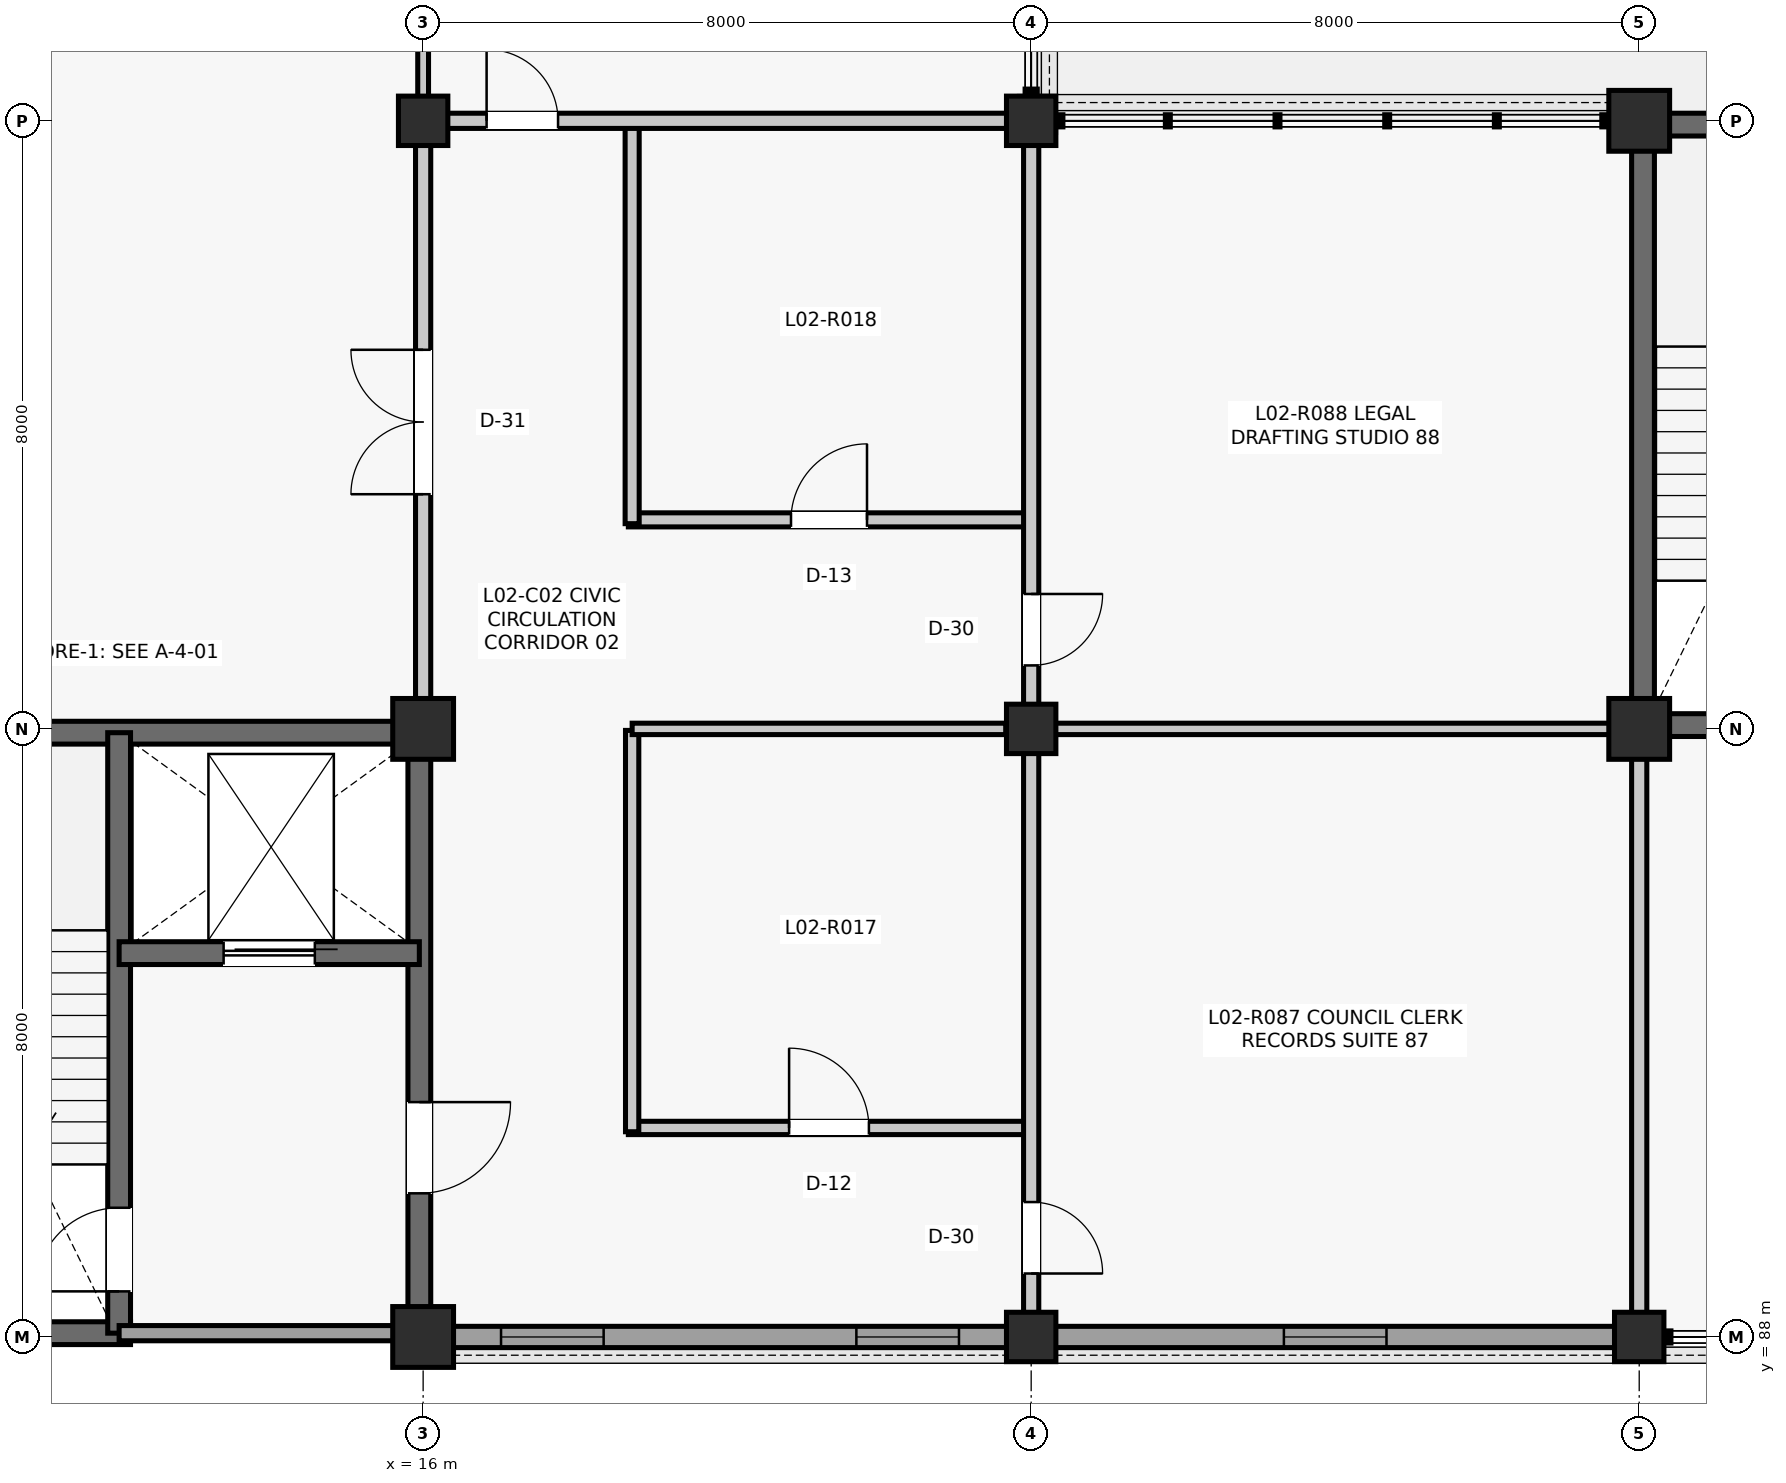
"""IFC4 building model, lengths in metres.
Left out: names, types, materials, properties, quantities, classifications, styles, units other than length and angle.
Written with IfcOpenShell. Run it as: python <this file> out.ifc"""

import sys

from ifc_helpers import new_model, si_unit, direction, frame, frame_2d, origin, origin_2d, place, context, subcontext, project, spatial, rectangle, extrude, element, fill, save


model = new_model("IFC4")
c1 = context("Model", 3, precision=1e-05, world=origin(), true_north=direction((0.0, 1.0)))
c2 = subcontext(c1, "Body", "Model", "MODEL_VIEW")
j1 = project(units=[si_unit("LENGTHUNIT", "METRE"), si_unit("PLANEANGLEUNIT", "RADIAN")], contexts=[c1])
p1 = place(None, origin())
s1 = spatial("IfcSite", under=j1, at=p1, CompositionType="ELEMENT")
p2 = place(p1, origin())
s2 = spatial("IfcBuilding", under=s1, at=p2, CompositionType="ELEMENT")
p3 = place(p2, frame((0.0, 0.0, 9.9)))
s3 = spatial("IfcBuildingStorey", under=s2, at=p3, CompositionType="ELEMENT", Elevation=9.9)
for number, where, z_axis, x_axis in (
    (1, (16.0, 88.0, 0.0), (0.0, 0.0, 1.0), (1.0, 0.0, 0.0)),
    (2, (16.0, 96.0, 0.0), (0.0, 0.0, 1.0), (1.0, 0.0, 0.0)),
):
    element("IfcColumn", number, at=place(p3, frame(where, z_axis=z_axis, x_axis=x_axis)), inside=s3, PredefinedType="COLUMN", context=c2, shape_type="SweptSolid", body=[
        extrude(rectangle(XDim=0.8, YDim=0.8, at=origin_2d()), origin(), (0.0, 0.0, 1.0), 3.96),
    ])
for number, where, z_axis, x_axis in (
    (3, (16.0, 104.0, 0.0), (0.0, 0.0, 1.0), (1.0, 0.0, 0.0)),
    (4, (24.0, 88.0, 0.0), (0.0, 0.0, 1.0), (1.0, 0.0, 0.0)),
    (5, (24.0, 96.0, 0.0), (0.0, 0.0, 1.0), (1.0, 0.0, 0.0)),
    (6, (24.0, 104.0, 0.0), (0.0, 0.0, 1.0), (1.0, 0.0, 0.0)),
    (7, (32.0, 88.0, 0.0), (0.0, 0.0, 1.0), (1.0, 0.0, 0.0)),
):
    element("IfcColumn", number, at=place(p3, frame(where, z_axis=z_axis, x_axis=x_axis)), inside=s3, PredefinedType="COLUMN", context=c2, shape_type="SweptSolid", body=[
        extrude(rectangle(XDim=0.65, YDim=0.65, at=origin_2d()), origin(), (0.0, 0.0, 1.0), 3.96),
    ])
for number, where, z_axis, x_axis in (
    (8, (32.0, 96.0, 0.0), (0.0, 0.0, 1.0), (1.0, 0.0, 0.0)),
    (9, (32.0, 104.0, 0.0), (0.0, 0.0, 1.0), (1.0, 0.0, 0.0)),
):
    element("IfcColumn", number, at=place(p3, frame(where, z_axis=z_axis, x_axis=x_axis)), inside=s3, PredefinedType="COLUMN", context=c2, shape_type="SweptSolid", body=[
        extrude(rectangle(XDim=0.8, YDim=0.8, at=origin_2d()), origin(), (0.0, 0.0, 1.0), 3.96),
    ])
p4 = place(p3, frame((16.385, 88.0, 0.0), z_axis=(0.0, 0.0, 1.0), x_axis=(1.0, 0.0, 0.0)))
e10 = element("IfcWall", 10, at=p4, inside=s3, PredefinedType="SOLIDWALL", context=c2, shape_type="SweptSolid", body=[
    extrude(rectangle(XDim=7.305, YDim=0.28, at=frame_2d((3.652, 0.0))), origin(), (0.0, 0.0, 1.0), 3.347),
])
p5 = place(p4, frame((0.64, 0.0, 0.95)))
e11 = element("IfcOpeningElement", 11, at=p5, cuts=e10, PredefinedType="OPENING", context=c2, shape_type="SweptSolid", body=[
    extrude(rectangle(XDim=1.35, YDim=1.9, at=frame_2d((0.675, 0.95))), frame((0.0, 0.15, 0.0), z_axis=(0.0, -1.0, 0.0), x_axis=(1.0, 0.0, 0.0)), (0.0, 0.0, 1.0), 0.3),
])
p6 = place(p4, frame((5.315, 0.0, 0.95)))
e12 = element("IfcOpeningElement", 12, at=p6, cuts=e10, PredefinedType="OPENING", context=c2, shape_type="SweptSolid", body=[
    extrude(rectangle(XDim=1.35, YDim=1.9, at=frame_2d((0.675, 0.95))), frame((0.0, 0.15, 0.0), z_axis=(0.0, -1.0, 0.0), x_axis=(1.0, 0.0, 0.0)), (0.0, 0.0, 1.0), 0.3),
])
p7 = place(p3, frame((24.31, 88.0, 0.0), z_axis=(0.0, 0.0, 1.0), x_axis=(1.0, 0.0, 0.0)))
e13 = element("IfcWall", 13, at=p7, inside=s3, PredefinedType="SOLIDWALL", context=c2, shape_type="SweptSolid", body=[
    extrude(rectangle(XDim=7.38, YDim=0.28, at=frame_2d((3.69, 0.0))), origin(), (0.0, 0.0, 1.0), 3.28),
])
p8 = place(p7, frame((3.015, 0.0, 0.9)))
e14 = element("IfcOpeningElement", 14, at=p8, cuts=e13, PredefinedType="OPENING", context=c2, shape_type="SweptSolid", body=[
    extrude(rectangle(XDim=1.35, YDim=1.9, at=frame_2d((0.675, 0.95))), frame((0.0, 0.15, 0.0), z_axis=(0.0, -1.0, 0.0), x_axis=(1.0, 0.0, 0.0)), (0.0, 0.0, 1.0), 0.3),
])
p9 = place(p3, frame((8.29, 95.95, 0.0), z_axis=(0.0, 0.0, 1.0), x_axis=(1.0, 0.0, 0.0)))
e15 = element("IfcWall", 15, at=p9, inside=s3, PredefinedType="SHEAR", context=c2, shape_type="SweptSolid", body=[
    extrude(rectangle(XDim=7.42, YDim=0.3, at=frame_2d((3.71, 0.0))), origin(), (0.0, 0.0, 1.0), 3.705),
])
p10 = place(p3, frame((15.95, 88.29, 0.0), z_axis=(0.0, 0.0, 1.0), x_axis=(0.0, 1.0, 0.0)))
e16 = element("IfcWall", 16, at=p10, inside=s3, PredefinedType="SHEAR", context=c2, shape_type="SweptSolid", body=[
    extrude(rectangle(XDim=7.42, YDim=0.3, at=frame_2d((3.71, 0.0))), origin(), (0.0, 0.0, 1.0), 3.705),
])
p11 = place(p10, frame((1.6, 0.0, 0.0)))
e17 = element("IfcOpeningElement", 17, at=p11, cuts=e16, PredefinedType="OPENING", context=c2, shape_type="SweptSolid", body=[
    extrude(rectangle(XDim=1.2, YDim=2.15, at=frame_2d((0.6, 1.075))), frame((0.0, 0.16, 0.0), z_axis=(0.0, -1.0, 0.0), x_axis=(1.0, 0.0, 0.0)), (0.0, 0.0, 1.0), 0.32),
])
p12 = place(p3, frame((8.29, 88.05, 0.0), z_axis=(0.0, 0.0, 1.0), x_axis=(1.0, 0.0, 0.0)))
e18 = element("IfcWall", 18, at=p12, inside=s3, PredefinedType="SHEAR", context=c2, shape_type="SweptSolid", body=[
    extrude(rectangle(XDim=3.86, YDim=0.3, at=frame_2d((1.93, 0.0))), origin(), (0.0, 0.0, 1.0), 3.705),
])
p13 = place(p3, frame((12.0, 88.05, 0.0), z_axis=(0.0, 0.0, 1.0), x_axis=(0.0, 1.0, 0.0)))
e19 = element("IfcWall", 19, at=p13, inside=s3, PredefinedType="SHEAR", context=c2, shape_type="SweptSolid", body=[
    extrude(rectangle(XDim=7.9, YDim=0.3, at=frame_2d((3.95, 0.0))), origin(), (0.0, 0.0, 1.0), 3.705),
])
p14 = place(p13, frame((0.55, 0.0, 0.0)))
e20 = element("IfcOpeningElement", 20, at=p14, cuts=e19, PredefinedType="OPENING", context=c2, shape_type="SweptSolid", body=[
    extrude(rectangle(XDim=1.1, YDim=2.15, at=frame_2d((0.55, 1.075))), frame((0.0, 0.16, 0.0), z_axis=(0.0, -1.0, 0.0), x_axis=(1.0, 0.0, 0.0)), (0.0, 0.0, 1.0), 0.32),
])
p15 = place(p3, frame((12.0, 93.05, 0.0), z_axis=(0.0, 0.0, 1.0), x_axis=(1.0, 0.0, 0.0)))
e21 = element("IfcWall", 21, at=p15, inside=s3, PredefinedType="SHEAR", context=c2, shape_type="SweptSolid", body=[
    extrude(rectangle(XDim=3.95, YDim=0.3, at=frame_2d((1.975, 0.0))), origin(), (0.0, 0.0, 1.0), 3.705),
])
p16 = place(p15, frame((1.375, 0.0, 0.0)))
e22 = element("IfcOpeningElement", 22, at=p16, cuts=e21, PredefinedType="OPENING", context=c2, shape_type="SweptSolid", body=[
    extrude(rectangle(XDim=1.2, YDim=2.2, at=frame_2d((0.6, 1.1))), frame((0.0, 0.16, 0.0), z_axis=(0.0, -1.0, 0.0), x_axis=(1.0, 0.0, 0.0)), (0.0, 0.0, 1.0), 0.32),
])
p17 = place(p3, frame((12.0, 88.05, 0.0), z_axis=(0.0, 0.0, 1.0), x_axis=(1.0, 0.0, 0.0)))
e23 = element("IfcWall", 23, at=p17, inside=s3, PredefinedType="PARTITIONING", context=c2, shape_type="SweptSolid", body=[
    extrude(rectangle(XDim=3.61, YDim=0.2, at=frame_2d((1.805, 0.0))), origin(), (0.0, 0.0, 1.0), 3.277),
])
for number, where, z_axis, x_axis in (
    (24, (32.05, 96.29, 0.0), (0.0, 0.0, 1.0), (0.0, 1.0, 0.0)),
    (25, (32.29, 103.95, 0.0), (0.0, 0.0, 1.0), (1.0, 0.0, 0.0)),
):
    element("IfcWall", number, at=place(p3, frame(where, z_axis=z_axis, x_axis=x_axis)), inside=s3, PredefinedType="SHEAR", context=c2, shape_type="SweptSolid", body=[
        extrude(rectangle(XDim=7.42, YDim=0.3, at=frame_2d((3.71, 0.0))), origin(), (0.0, 0.0, 1.0), 3.705),
    ])
p18 = place(p3, frame((32.29, 96.05, 0.0), z_axis=(0.0, 0.0, 1.0), x_axis=(1.0, 0.0, 0.0)))
e26 = element("IfcWall", 26, at=p18, inside=s3, PredefinedType="SHEAR", context=c2, shape_type="SweptSolid", body=[
    extrude(rectangle(XDim=3.86, YDim=0.3, at=frame_2d((1.93, 0.0))), origin(), (0.0, 0.0, 1.0), 3.705),
])
p19 = place(p3, frame((18.7, 90.75, 0.0), z_axis=(0.0, 0.0, 1.0), x_axis=(1.0, 0.0, 0.0)))
e27 = element("IfcWall", 27, at=p19, inside=s3, PredefinedType="PARTITIONING", context=c2, shape_type="SweptSolid", body=[
    extrude(rectangle(XDim=5.28, YDim=0.175, at=frame_2d((2.64, 0.0))), origin(), (0.0, 0.0, 1.0), 3.151),
])
p20 = place(p19, frame((2.115, 0.0, 0.0)))
e28 = element("IfcOpeningElement", 28, at=p20, cuts=e27, PredefinedType="OPENING", context=c2, shape_type="SweptSolid", body=[
    extrude(rectangle(XDim=1.05, YDim=2.15, at=frame_2d((0.525, 1.075))), frame((0.0, 0.097, 0.0), z_axis=(0.0, -1.0, 0.0), x_axis=(1.0, 0.0, 0.0)), (0.0, 0.0, 1.0), 0.195),
])
p21 = place(p3, frame((18.75, 90.7, 0.0), z_axis=(0.0, 0.0, 1.0), x_axis=(0.0, 1.0, 0.0)))
e29 = element("IfcWall", 29, at=p21, inside=s3, PredefinedType="PARTITIONING", context=c2, shape_type="SweptSolid", body=[
    extrude(rectangle(XDim=5.28, YDim=0.175, at=frame_2d((2.64, 0.0))), origin(), (0.0, 0.0, 1.0), 3.141),
])
p22 = place(p3, frame((18.75, 96.0, 0.0), z_axis=(0.0, 0.0, 1.0), x_axis=(1.0, 0.0, 0.0)))
e30 = element("IfcWall", 30, at=p22, inside=s3, PredefinedType="PARTITIONING", context=c2, shape_type="SweptSolid", body=[
    extrude(rectangle(XDim=4.915, YDim=0.15, at=frame_2d((2.458, 0.0))), origin(), (0.0, 0.0, 1.0), 3.141),
])
p23 = place(p3, frame((18.7, 98.75, 0.0), z_axis=(0.0, 0.0, 1.0), x_axis=(1.0, 0.0, 0.0)))
e31 = element("IfcWall", 31, at=p23, inside=s3, PredefinedType="PARTITIONING", context=c2, shape_type="SweptSolid", body=[
    extrude(rectangle(XDim=5.28, YDim=0.185, at=frame_2d((2.64, 0.0))), origin(), (0.0, 0.0, 1.0), 3.221),
])
p24 = place(p23, frame((2.14, 0.0, 0.0)))
e32 = element("IfcOpeningElement", 32, at=p24, cuts=e31, PredefinedType="OPENING", context=c2, shape_type="SweptSolid", body=[
    extrude(rectangle(XDim=1.0, YDim=2.15, at=frame_2d((0.5, 1.075))), frame((0.0, 0.103, 0.0), z_axis=(0.0, -1.0, 0.0), x_axis=(1.0, 0.0, 0.0)), (0.0, 0.0, 1.0), 0.205),
])
p25 = place(p3, frame((18.75, 98.7, 0.0), z_axis=(0.0, 0.0, 1.0), x_axis=(0.0, 1.0, 0.0)))
e33 = element("IfcWall", 33, at=p25, inside=s3, PredefinedType="PARTITIONING", context=c2, shape_type="SweptSolid", body=[
    extrude(rectangle(XDim=5.28, YDim=0.185, at=frame_2d((2.64, 0.0))), origin(), (0.0, 0.0, 1.0), 3.151),
])
p26 = place(p3, frame((16.0, 96.39, 0.0), z_axis=(0.0, 0.0, 1.0), x_axis=(0.0, 1.0, 0.0)))
e34 = element("IfcWall", 34, at=p26, inside=s3, PredefinedType="PARTITIONING", context=c2, shape_type="SweptSolid", body=[
    extrude(rectangle(XDim=7.295, YDim=0.2, at=frame_2d((3.647, 0.0))), origin(), (0.0, 0.0, 1.0), 3.151),
])
p27 = place(p26, frame((2.698, 0.0, 0.0)))
e35 = element("IfcOpeningElement", 35, at=p27, cuts=e34, PredefinedType="OPENING", context=c2, shape_type="SweptSolid", body=[
    extrude(rectangle(XDim=1.9, YDim=2.38, at=frame_2d((0.95, 1.19))), frame((0.0, 0.11, 0.0), z_axis=(0.0, -1.0, 0.0), x_axis=(1.0, 0.0, 0.0)), (0.0, 0.0, 1.0), 0.22),
])
p28 = place(p3, frame((16.0, 104.315, 0.0), z_axis=(0.0, 0.0, 1.0), x_axis=(0.0, 1.0, 0.0)))
e36 = element("IfcWall", 36, at=p28, inside=s3, PredefinedType="PARTITIONING", context=c2, shape_type="SweptSolid", body=[
    extrude(rectangle(XDim=7.37, YDim=0.142, at=frame_2d((3.685, 0.0))), origin(), (0.0, 0.0, 1.0), 3.221),
])
p29 = place(p3, frame((24.0, 88.315, 0.0), z_axis=(0.0, 0.0, 1.0), x_axis=(0.0, 1.0, 0.0)))
e37 = element("IfcWall", 37, at=p29, inside=s3, PredefinedType="PARTITIONING", context=c2, shape_type="SweptSolid", body=[
    extrude(rectangle(XDim=7.37, YDim=0.2, at=frame_2d((3.685, 0.0))), origin(), (0.0, 0.0, 1.0), 3.151),
])
p30 = place(p29, frame((0.52, 0.0, 0.0)))
e38 = element("IfcOpeningElement", 38, at=p30, cuts=e37, PredefinedType="OPENING", context=c2, shape_type="SweptSolid", body=[
    extrude(rectangle(XDim=0.94, YDim=2.12, at=frame_2d((0.47, 1.06))), frame((0.0, 0.11, 0.0), z_axis=(0.0, -1.0, 0.0), x_axis=(1.0, 0.0, 0.0)), (0.0, 0.0, 1.0), 0.22),
])
p31 = place(p3, frame((24.0, 96.315, 0.0), z_axis=(0.0, 0.0, 1.0), x_axis=(0.0, 1.0, 0.0)))
e39 = element("IfcWall", 39, at=p31, inside=s3, PredefinedType="PARTITIONING", context=c2, shape_type="SweptSolid", body=[
    extrude(rectangle(XDim=7.37, YDim=0.2, at=frame_2d((3.685, 0.0))), origin(), (0.0, 0.0, 1.0), 3.221),
])
p32 = place(p31, frame((0.52, 0.0, 0.0)))
e40 = element("IfcOpeningElement", 40, at=p32, cuts=e39, PredefinedType="OPENING", context=c2, shape_type="SweptSolid", body=[
    extrude(rectangle(XDim=0.94, YDim=2.12, at=frame_2d((0.47, 1.06))), frame((0.0, 0.11, 0.0), z_axis=(0.0, -1.0, 0.0), x_axis=(1.0, 0.0, 0.0)), (0.0, 0.0, 1.0), 0.22),
])
p33 = place(p3, frame((16.315, 104.0, 0.0), z_axis=(0.0, 0.0, 1.0), x_axis=(1.0, 0.0, 0.0)))
e41 = element("IfcWall", 41, at=p33, inside=s3, PredefinedType="PARTITIONING", context=c2, shape_type="SweptSolid", body=[
    extrude(rectangle(XDim=7.37, YDim=0.2, at=frame_2d((3.685, 0.0))), origin(), (0.0, 0.0, 1.0), 3.151),
])
p34 = place(p33, frame((0.52, 0.0, 0.0)))
e42 = element("IfcOpeningElement", 42, at=p34, cuts=e41, PredefinedType="OPENING", context=c2, shape_type="SweptSolid", body=[
    extrude(rectangle(XDim=0.94, YDim=2.12, at=frame_2d((0.47, 1.06))), frame((0.0, 0.11, 0.0), z_axis=(0.0, -1.0, 0.0), x_axis=(1.0, 0.0, 0.0)), (0.0, 0.0, 1.0), 0.22),
])
p35 = place(p3, frame((32.0, 88.315, 0.0), z_axis=(0.0, 0.0, 1.0), x_axis=(0.0, 1.0, 0.0)))
e43 = element("IfcWall", 43, at=p35, inside=s3, PredefinedType="PARTITIONING", context=c2, shape_type="SweptSolid", body=[
    extrude(rectangle(XDim=7.295, YDim=0.2, at=frame_2d((3.647, 0.0))), origin(), (0.0, 0.0, 1.0), 3.221),
])
p36 = place(p3, frame((24.315, 96.0, 0.0), z_axis=(0.0, 0.0, 1.0), x_axis=(1.0, 0.0, 0.0)))
e44 = element("IfcWall", 44, at=p36, inside=s3, PredefinedType="PARTITIONING", context=c2, shape_type="SweptSolid", body=[
    extrude(rectangle(XDim=7.295, YDim=0.15, at=frame_2d((3.647, 0.0))), origin(), (0.0, 0.0, 1.0), 3.151),
])
p37 = place(p5, origin())
e45 = element("IfcWindow", 45, at=p37, inside=s3, PartitioningType="SINGLE_PANEL", PredefinedType="WINDOW", context=c2, shape_type="SweptSolid", body=[
    extrude(rectangle(XDim=1.35, YDim=1.9, at=frame_2d((0.675, 0.95))), frame((0.0, 0.03, 0.0), z_axis=(0.0, -1.0, 0.0), x_axis=(1.0, 0.0, 0.0)), (0.0, 0.0, 1.0), 0.06),
])
fill(e11, e45)
p38 = place(p6, origin())
e46 = element("IfcWindow", 46, at=p38, inside=s3, PartitioningType="SINGLE_PANEL", PredefinedType="WINDOW", context=c2, shape_type="SweptSolid", body=[
    extrude(rectangle(XDim=1.35, YDim=1.9, at=frame_2d((0.675, 0.95))), frame((0.0, 0.03, 0.0), z_axis=(0.0, -1.0, 0.0), x_axis=(1.0, 0.0, 0.0)), (0.0, 0.0, 1.0), 0.06),
])
fill(e12, e46)
p39 = place(p8, origin())
e47 = element("IfcWindow", 47, at=p39, inside=s3, PartitioningType="SINGLE_PANEL", PredefinedType="WINDOW", context=c2, shape_type="SweptSolid", body=[
    extrude(rectangle(XDim=1.35, YDim=1.9, at=frame_2d((0.675, 0.95))), frame((0.0, 0.03, 0.0), z_axis=(0.0, -1.0, 0.0), x_axis=(1.0, 0.0, 0.0)), (0.0, 0.0, 1.0), 0.06),
])
fill(e14, e47)
p40 = place(p14, origin())
e48 = element("IfcDoor", 48, at=p40, inside=s3, OperationType="SINGLE_SWING_LEFT", PredefinedType="DOOR", context=c2, shape_type="SweptSolid", body=[
    extrude(rectangle(XDim=1.1, YDim=2.15, at=frame_2d((0.55, 1.075))), frame((0.0, 0.025, 0.0), z_axis=(0.0, -1.0, 0.0), x_axis=(1.0, 0.0, 0.0)), (0.0, 0.0, 1.0), 0.05),
])
fill(e20, e48)
p41 = place(p16, origin())
e49 = element("IfcDoor", 49, at=p41, inside=s3, OperationType="SLIDING_TO_LEFT", PredefinedType="DOOR", context=c2, shape_type="SweptSolid", body=[
    extrude(rectangle(XDim=1.2, YDim=2.2, at=frame_2d((0.6, 1.1))), frame((0.0, 0.025, 0.0), z_axis=(0.0, -1.0, 0.0), x_axis=(1.0, 0.0, 0.0)), (0.0, 0.0, 1.0), 0.05),
])
fill(e22, e49)
p42 = place(p11, frame((1.2, 0.0, 0.0), z_axis=(0.0, 0.0, 1.0), x_axis=(-1.0, 0.0, 0.0)))
e50 = element("IfcDoor", 50, at=p42, inside=s3, OperationType="SINGLE_SWING_RIGHT", PredefinedType="DOOR", context=c2, shape_type="SweptSolid", body=[
    extrude(rectangle(XDim=1.2, YDim=2.15, at=frame_2d((0.6, 1.075))), frame((0.0, 0.025, 0.0), z_axis=(0.0, -1.0, 0.0), x_axis=(1.0, 0.0, 0.0)), (0.0, 0.0, 1.0), 0.05),
])
fill(e17, e50)
p43 = place(p20, origin())
e51 = element("IfcDoor", 51, at=p43, inside=s3, OperationType="SINGLE_SWING_LEFT", PredefinedType="DOOR", context=c2, shape_type="SweptSolid", body=[
    extrude(rectangle(XDim=1.05, YDim=2.15, at=frame_2d((0.525, 1.075))), frame((0.0, 0.025, 0.0), z_axis=(0.0, -1.0, 0.0), x_axis=(1.0, 0.0, 0.0)), (0.0, 0.0, 1.0), 0.05),
])
fill(e28, e51)
p44 = place(p24, origin())
e52 = element("IfcDoor", 52, at=p44, inside=s3, OperationType="SINGLE_SWING_RIGHT", PredefinedType="DOOR", context=c2, shape_type="SweptSolid", body=[
    extrude(rectangle(XDim=1.0, YDim=2.15, at=frame_2d((0.5, 1.075))), frame((0.0, 0.025, 0.0), z_axis=(0.0, -1.0, 0.0), x_axis=(1.0, 0.0, 0.0)), (0.0, 0.0, 1.0), 0.05),
])
fill(e32, e52)
p45 = place(p27, origin())
e53 = element("IfcDoor", 53, at=p45, inside=s3, OperationType="DOUBLE_DOOR_SINGLE_SWING", PredefinedType="DOOR", context=c2, shape_type="SweptSolid", body=[
    extrude(rectangle(XDim=1.9, YDim=2.38, at=frame_2d((0.95, 1.19))), frame((0.0, 0.025, 0.0), z_axis=(0.0, -1.0, 0.0), x_axis=(1.0, 0.0, 0.0)), (0.0, 0.0, 1.0), 0.05),
])
fill(e35, e53)
p46 = place(p30, frame((0.94, 0.0, 0.0), z_axis=(0.0, 0.0, 1.0), x_axis=(-1.0, 0.0, 0.0)))
e54 = element("IfcDoor", 54, at=p46, inside=s3, OperationType="SINGLE_SWING_LEFT", PredefinedType="DOOR", context=c2, shape_type="SweptSolid", body=[
    extrude(rectangle(XDim=0.94, YDim=2.12, at=frame_2d((0.47, 1.06))), frame((0.0, 0.025, 0.0), z_axis=(0.0, -1.0, 0.0), x_axis=(1.0, 0.0, 0.0)), (0.0, 0.0, 1.0), 0.05),
])
fill(e38, e54)
p47 = place(p32, frame((0.94, 0.0, 0.0), z_axis=(0.0, 0.0, 1.0), x_axis=(-1.0, 0.0, 0.0)))
e55 = element("IfcDoor", 55, at=p47, inside=s3, OperationType="SINGLE_SWING_RIGHT", PredefinedType="DOOR", context=c2, shape_type="SweptSolid", body=[
    extrude(rectangle(XDim=0.94, YDim=2.12, at=frame_2d((0.47, 1.06))), frame((0.0, 0.025, 0.0), z_axis=(0.0, -1.0, 0.0), x_axis=(1.0, 0.0, 0.0)), (0.0, 0.0, 1.0), 0.05),
])
fill(e40, e55)
p48 = place(p34, origin())
e56 = element("IfcDoor", 56, at=p48, inside=s3, OperationType="SINGLE_SWING_LEFT", PredefinedType="DOOR", context=c2, shape_type="SweptSolid", body=[
    extrude(rectangle(XDim=0.94, YDim=2.12, at=frame_2d((0.47, 1.06))), frame((0.0, 0.025, 0.0), z_axis=(0.0, -1.0, 0.0), x_axis=(1.0, 0.0, 0.0)), (0.0, 0.0, 1.0), 0.05),
])
fill(e42, e56)
save(model, sys.argv[1])
